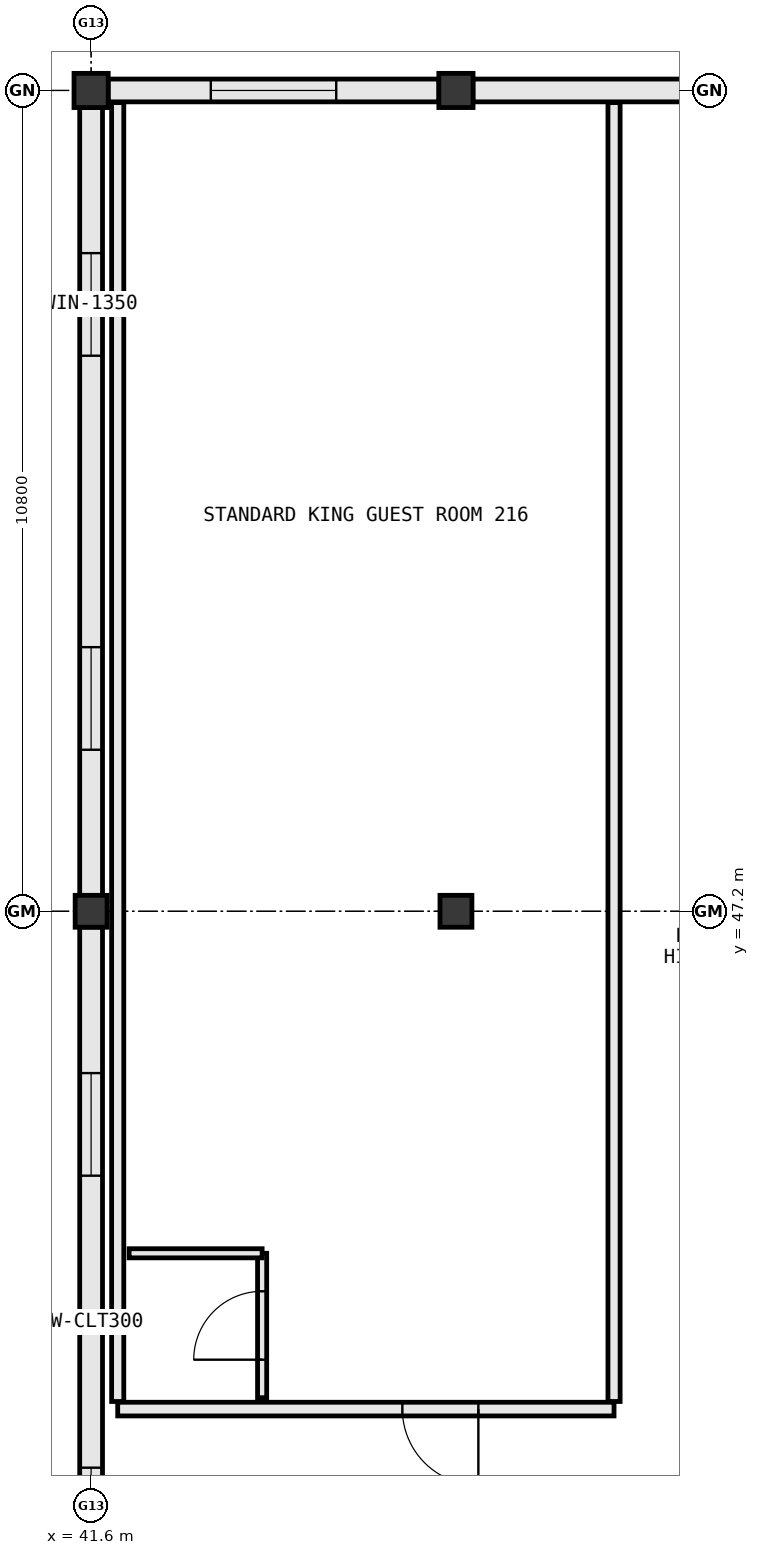
"""IFC4 building model, lengths in metres.
Left out: names, types, materials, properties, quantities, classifications, styles, units other than length and angle.
Written with IfcOpenShell. Run it as: python <this file> out.ifc"""

import sys

from ifc_helpers import new_model, si_unit, direction, frame, frame_2d, origin, origin_2d, place, context, subcontext, project, spatial, rectangle, extrude, element, fill, save


model = new_model("IFC4")
c1 = context("Model", 3, precision=1e-05, world=origin(), true_north=direction((0.0, 1.0)))
c2 = subcontext(c1, "Body", "Model", "MODEL_VIEW")
j1 = project(units=[si_unit("LENGTHUNIT", "METRE"), si_unit("PLANEANGLEUNIT", "RADIAN")], contexts=[c1])
p1 = place(None, origin())
s1 = spatial("IfcSite", under=j1, at=p1, CompositionType="ELEMENT")
p2 = place(p1, origin())
s2 = spatial("IfcBuilding", under=s1, at=p2, CompositionType="ELEMENT")
p3 = place(p2, frame((0.0, 0.0, 27.6)))
s3 = spatial("IfcBuildingStorey", under=s2, at=p3, CompositionType="ELEMENT", Elevation=27.6)
p4 = place(p3, frame((41.6, 58.0, 0.0), z_axis=(0.0, 0.0, 1.0), x_axis=(1.0, 0.0, 0.0)))
e1 = element("IfcColumn", 1, at=p4, inside=s3, PredefinedType="COLUMN", context=c2, shape_type="SweptSolid", body=[
    extrude(rectangle(XDim=0.45, YDim=0.45, at=origin_2d()), origin(), (0.0, 0.0, 1.0), 3.8),
])
for number, where, z_axis, x_axis in (
    (2, (41.6, 47.2, 0.0), (0.0, 0.0, 1.0), (1.0, 0.0, 0.0)),
    (3, (46.4, 47.2, 0.0), (0.0, 0.0, 1.0), (1.0, 0.0, 0.0)),
):
    element("IfcColumn", number, at=place(p3, frame(where, z_axis=z_axis, x_axis=x_axis)), inside=s3, PredefinedType="COLUMN", context=c2, shape_type="SweptSolid", body=[
        extrude(rectangle(XDim=0.42, YDim=0.42, at=origin_2d()), origin(), (0.0, 0.0, 1.0), 3.8),
    ])
p5 = place(p3, frame((46.4, 58.0, 0.0), z_axis=(0.0, 0.0, 1.0), x_axis=(1.0, 0.0, 0.0)))
e4 = element("IfcColumn", 4, at=p5, inside=s3, PredefinedType="COLUMN", context=c2, shape_type="SweptSolid", body=[
    extrude(rectangle(XDim=0.45, YDim=0.45, at=origin_2d()), origin(), (0.0, 0.0, 1.0), 3.8),
])
p6 = place(p3, frame((50.977, 58.0, 0.0), z_axis=(0.0, 0.0, 1.0), x_axis=(-1.0, 0.0, 0.0)))
e5 = element("IfcWall", 5, at=p6, inside=s3, PredefinedType="STANDARD", context=c2, shape_type="SweptSolid", body=[
    extrude(rectangle(XDim=4.354, YDim=0.3, at=frame_2d((2.177, 0.0))), origin(), (0.0, 0.0, 1.0), 2.87),
])
p7 = place(p3, frame((46.177, 58.0, 0.0), z_axis=(0.0, 0.0, 1.0), x_axis=(-1.0, 0.0, 0.0)))
e6 = element("IfcWall", 6, at=p7, inside=s3, PredefinedType="STANDARD", context=c2, shape_type="SweptSolid", body=[
    extrude(rectangle(XDim=4.354, YDim=0.3, at=frame_2d((2.177, 0.0))), origin(), (0.0, 0.0, 1.0), 2.87),
])
p8 = place(p7, frame((1.352, 0.0, 0.85)))
e7 = element("IfcOpeningElement", 7, at=p8, cuts=e6, PredefinedType="OPENING", context=c2, shape_type="SweptSolid", body=[
    extrude(rectangle(XDim=1.65, YDim=1.8, at=frame_2d((0.825, 0.9))), frame((0.0, 0.162, 0.0), z_axis=(0.0, -1.0, 0.0), x_axis=(1.0, 0.0, 0.0)), (0.0, 0.0, 1.0), 0.324),
])
p9 = place(p3, frame((41.6, 57.777, 0.0), z_axis=(0.0, 0.0, 1.0), x_axis=(0.0, -1.0, 0.0)))
e8 = element("IfcWall", 8, at=p9, inside=s3, PredefinedType="STANDARD", context=c2, shape_type="SweptSolid", body=[
    extrude(rectangle(XDim=10.369, YDim=0.3, at=frame_2d((5.185, 0.0))), origin(), (0.0, 0.0, 1.0), 2.91),
])
p10 = place(p9, frame((1.917, 0.0, 0.85)))
e9 = element("IfcOpeningElement", 9, at=p10, cuts=e8, PredefinedType="OPENING", context=c2, shape_type="SweptSolid", body=[
    extrude(rectangle(XDim=1.35, YDim=1.65, at=frame_2d((0.675, 0.825))), frame((0.0, 0.162, 0.0), z_axis=(0.0, -1.0, 0.0), x_axis=(1.0, 0.0, 0.0)), (0.0, 0.0, 1.0), 0.324),
])
p11 = place(p9, frame((7.102, 0.0, 0.85)))
e10 = element("IfcOpeningElement", 10, at=p11, cuts=e8, PredefinedType="OPENING", context=c2, shape_type="SweptSolid", body=[
    extrude(rectangle(XDim=1.35, YDim=1.65, at=frame_2d((0.675, 0.825))), frame((0.0, 0.162, 0.0), z_axis=(0.0, -1.0, 0.0), x_axis=(1.0, 0.0, 0.0)), (0.0, 0.0, 1.0), 0.324),
])
p12 = place(p3, frame((41.6, 46.992, 0.0), z_axis=(0.0, 0.0, 1.0), x_axis=(0.0, -1.0, 0.0)))
e11 = element("IfcWall", 11, at=p12, inside=s3, PredefinedType="STANDARD", context=c2, shape_type="SweptSolid", body=[
    extrude(rectangle(XDim=10.384, YDim=0.3, at=frame_2d((5.192, 0.0))), origin(), (0.0, 0.0, 1.0), 2.91),
])
p13 = place(p12, frame((1.921, 0.0, 0.85)))
e12 = element("IfcOpeningElement", 12, at=p13, cuts=e11, PredefinedType="OPENING", context=c2, shape_type="SweptSolid", body=[
    extrude(rectangle(XDim=1.35, YDim=1.65, at=frame_2d((0.675, 0.825))), frame((0.0, 0.162, 0.0), z_axis=(0.0, -1.0, 0.0), x_axis=(1.0, 0.0, 0.0)), (0.0, 0.0, 1.0), 0.324),
])
p14 = place(p12, frame((7.113, 0.0, 0.85)))
e13 = element("IfcOpeningElement", 13, at=p14, cuts=e11, PredefinedType="OPENING", context=c2, shape_type="SweptSolid", body=[
    extrude(rectangle(XDim=1.35, YDim=1.65, at=frame_2d((0.675, 0.825))), frame((0.0, 0.162, 0.0), z_axis=(0.0, -1.0, 0.0), x_axis=(1.0, 0.0, 0.0)), (0.0, 0.0, 1.0), 0.324),
])
p15 = place(p3, frame((41.95, 40.65, 0.0), z_axis=(0.0, 0.0, 1.0), x_axis=(1.0, 0.0, 0.0)))
e14 = element("IfcWall", 14, at=p15, inside=s3, PredefinedType="PARTITIONING", context=c2, shape_type="SweptSolid", body=[
    extrude(rectangle(XDim=6.53, YDim=0.18, at=frame_2d((3.265, 0.0))), origin(), (0.0, 0.0, 1.0), 3.555),
])
p16 = place(p15, frame((3.745, 0.0, 0.0)))
e15 = element("IfcOpeningElement", 15, at=p16, cuts=e14, PredefinedType="OPENING", context=c2, shape_type="SweptSolid", body=[
    extrude(rectangle(XDim=1.0, YDim=2.2, at=frame_2d((0.5, 1.1))), frame((0.0, 0.102, 0.0), z_axis=(0.0, -1.0, 0.0), x_axis=(1.0, 0.0, 0.0)), (0.0, 0.0, 1.0), 0.204),
])
p17 = place(p3, frame((41.95, 40.75, 0.0), z_axis=(0.0, 0.0, 1.0), x_axis=(0.0, 1.0, 0.0)))
e16 = element("IfcWall", 16, at=p17, inside=s3, PredefinedType="PARTITIONING", context=c2, shape_type="SweptSolid", body=[
    extrude(rectangle(XDim=17.09, YDim=0.16, at=frame_2d((8.545, 0.0))), origin(), (0.0, 0.0, 1.0), 2.91),
])
p18 = place(p3, frame((48.48, 40.75, 0.0), z_axis=(0.0, 0.0, 1.0), x_axis=(0.0, 1.0, 0.0)))
e17 = element("IfcWall", 17, at=p18, inside=s3, PredefinedType="PARTITIONING", context=c2, shape_type="SweptSolid", body=[
    extrude(rectangle(XDim=17.09, YDim=0.16, at=frame_2d((8.545, 0.0))), origin(), (0.0, 0.0, 1.0), 3.1),
])
p19 = place(p3, frame((43.85, 40.8, 0.0), z_axis=(0.0, 0.0, 1.0), x_axis=(0.0, 1.0, 0.0)))
e18 = element("IfcWall", 18, at=p19, inside=s3, PredefinedType="PARTITIONING", context=c2, shape_type="SweptSolid", body=[
    extrude(rectangle(XDim=1.9, YDim=0.12, at=frame_2d((0.95, 0.0))), origin(), (0.0, 0.0, 1.0), 3.1),
])
p20 = place(p19, frame((0.5, 0.0, 0.0)))
e19 = element("IfcOpeningElement", 19, at=p20, cuts=e18, PredefinedType="OPENING", context=c2, shape_type="SweptSolid", body=[
    extrude(rectangle(XDim=0.9, YDim=2.15, at=frame_2d((0.45, 1.075))), frame((0.0, 0.072, 0.0), z_axis=(0.0, -1.0, 0.0), x_axis=(1.0, 0.0, 0.0)), (0.0, 0.0, 1.0), 0.144),
])
p21 = place(p3, frame((42.1, 42.7, 0.0), z_axis=(0.0, 0.0, 1.0), x_axis=(1.0, 0.0, 0.0)))
e20 = element("IfcWall", 20, at=p21, inside=s3, PredefinedType="PARTITIONING", context=c2, shape_type="SweptSolid", body=[
    extrude(rectangle(XDim=1.75, YDim=0.12, at=frame_2d((0.875, 0.0))), origin(), (0.0, 0.0, 1.0), 3.555),
])
p22 = place(p8, origin())
e21 = element("IfcWindow", 21, at=p22, inside=s3, PartitioningType="SINGLE_PANEL", PredefinedType="WINDOW", context=c2, shape_type="SweptSolid", body=[
    extrude(rectangle(XDim=1.65, YDim=1.8, at=frame_2d((0.825, 0.9))), frame((0.0, 0.03, 0.0), z_axis=(0.0, -1.0, 0.0), x_axis=(1.0, 0.0, 0.0)), (0.0, 0.0, 1.0), 0.06),
])
fill(e7, e21)
p23 = place(p10, origin())
e22 = element("IfcWindow", 22, at=p23, inside=s3, PartitioningType="SINGLE_PANEL", PredefinedType="WINDOW", context=c2, shape_type="SweptSolid", body=[
    extrude(rectangle(XDim=1.35, YDim=1.65, at=frame_2d((0.675, 0.825))), frame((0.0, 0.03, 0.0), z_axis=(0.0, -1.0, 0.0), x_axis=(1.0, 0.0, 0.0)), (0.0, 0.0, 1.0), 0.06),
])
fill(e9, e22)
p24 = place(p11, origin())
e23 = element("IfcWindow", 23, at=p24, inside=s3, PartitioningType="SINGLE_PANEL", PredefinedType="WINDOW", context=c2, shape_type="SweptSolid", body=[
    extrude(rectangle(XDim=1.35, YDim=1.65, at=frame_2d((0.675, 0.825))), frame((0.0, 0.03, 0.0), z_axis=(0.0, -1.0, 0.0), x_axis=(1.0, 0.0, 0.0)), (0.0, 0.0, 1.0), 0.06),
])
fill(e10, e23)
p25 = place(p13, origin())
e24 = element("IfcWindow", 24, at=p25, inside=s3, PartitioningType="SINGLE_PANEL", PredefinedType="WINDOW", context=c2, shape_type="SweptSolid", body=[
    extrude(rectangle(XDim=1.35, YDim=1.65, at=frame_2d((0.675, 0.825))), frame((0.0, 0.03, 0.0), z_axis=(0.0, -1.0, 0.0), x_axis=(1.0, 0.0, 0.0)), (0.0, 0.0, 1.0), 0.06),
])
fill(e12, e24)
p26 = place(p14, origin())
e25 = element("IfcWindow", 25, at=p26, inside=s3, PartitioningType="SINGLE_PANEL", PredefinedType="WINDOW", context=c2, shape_type="SweptSolid", body=[
    extrude(rectangle(XDim=1.35, YDim=1.65, at=frame_2d((0.675, 0.825))), frame((0.0, 0.03, 0.0), z_axis=(0.0, -1.0, 0.0), x_axis=(1.0, 0.0, 0.0)), (0.0, 0.0, 1.0), 0.06),
])
fill(e13, e25)
p27 = place(p16, frame((1.0, 0.0, 0.0), z_axis=(0.0, 0.0, 1.0), x_axis=(-1.0, 0.0, 0.0)))
e26 = element("IfcDoor", 26, at=p27, inside=s3, OperationType="SINGLE_SWING_RIGHT", PredefinedType="DOOR", context=c2, shape_type="SweptSolid", body=[
    extrude(rectangle(XDim=1.0, YDim=2.2, at=frame_2d((0.5, 1.1))), frame((0.0, 0.025, 0.0), z_axis=(0.0, -1.0, 0.0), x_axis=(1.0, 0.0, 0.0)), (0.0, 0.0, 1.0), 0.05),
])
fill(e15, e26)
p28 = place(p20, origin())
e27 = element("IfcDoor", 27, at=p28, inside=s3, OperationType="SINGLE_SWING_LEFT", PredefinedType="DOOR", context=c2, shape_type="SweptSolid", body=[
    extrude(rectangle(XDim=0.9, YDim=2.15, at=frame_2d((0.45, 1.075))), frame((0.0, 0.025, 0.0), z_axis=(0.0, -1.0, 0.0), x_axis=(1.0, 0.0, 0.0)), (0.0, 0.0, 1.0), 0.05),
])
fill(e19, e27)
save(model, sys.argv[1])
